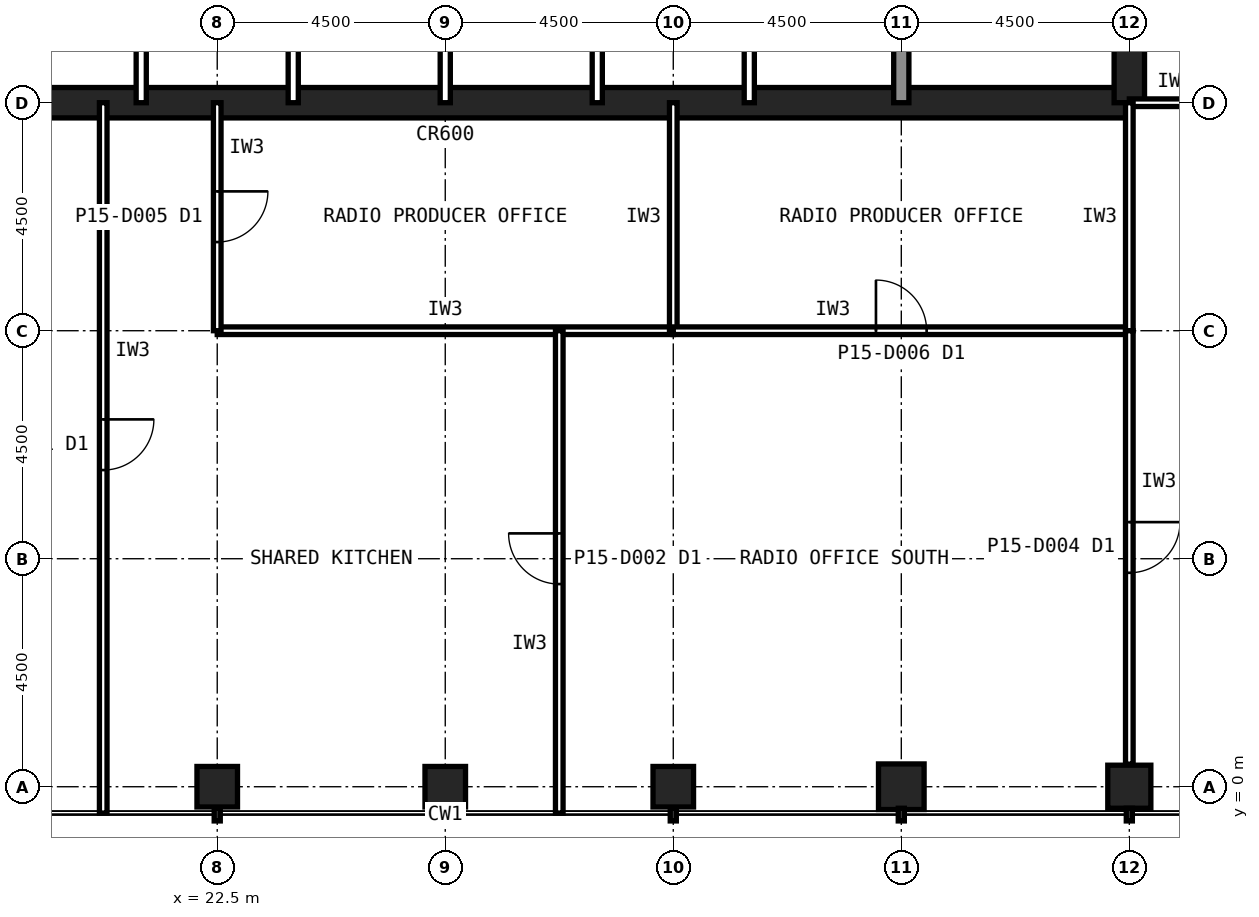
"""IFC4 building model, lengths in metres.
Left out: names, types, materials, properties, quantities, classifications, styles, units other than length and angle.
Written with IfcOpenShell. Run it as: python <this file> out.ifc"""

import sys

from ifc_helpers import new_model, si_unit, direction, frame, frame_2d, origin, origin_2d, place, context, subcontext, project, spatial, rectangle, hollow_rectangle, extrude, element, fill, save


model = new_model("IFC4")
c1 = context("Model", 3, precision=1e-05, world=origin(), true_north=direction((0.0, 1.0)))
c2 = subcontext(c1, "Body", "Model", "MODEL_VIEW")
j1 = project(units=[si_unit("LENGTHUNIT", "METRE"), si_unit("PLANEANGLEUNIT", "RADIAN")], contexts=[c1])
p1 = place(None, origin())
s1 = spatial("IfcSite", under=j1, at=p1, CompositionType="ELEMENT")
p2 = place(p1, origin())
s2 = spatial("IfcBuilding", under=s1, at=p2, CompositionType="ELEMENT")
p3 = place(p2, frame((0.0, 0.0, 62.6)))
s3 = spatial("IfcBuildingStorey", under=s2, at=p3, CompositionType="ELEMENT", Elevation=62.6)
for number, where, z_axis, x_axis in (
    (1, (22.5, 0.0, 0.0), (0.0, 0.0, 1.0), (1.0, 0.0, 0.0)),
    (2, (27.0, 0.0, 0.0), (0.0, 0.0, 1.0), (1.0, 0.0, 0.0)),
    (3, (31.5, 0.0, 0.0), (0.0, 0.0, 1.0), (1.0, 0.0, 0.0)),
):
    element("IfcColumn", number, at=place(p3, frame(where, z_axis=z_axis, x_axis=x_axis)), inside=s3, PredefinedType="COLUMN", context=c2, shape_type="SweptSolid", body=[
        extrude(hollow_rectangle(XDim=0.8, YDim=0.8, WallThickness=0.045, at=origin_2d()), origin(), (0.0, 0.0, 1.0), 4.2),
    ])
p4 = place(p3, frame((36.0, 0.0, 0.0), z_axis=(0.0, 0.0, 1.0), x_axis=(1.0, 0.0, 0.0)))
e4 = element("IfcColumn", 4, at=p4, inside=s3, PredefinedType="COLUMN", context=c2, shape_type="SweptSolid", body=[
    extrude(hollow_rectangle(XDim=0.9, YDim=0.9, WallThickness=0.063, at=origin_2d()), origin(), (0.0, 0.0, 1.0), 4.2),
])
p5 = place(p3, frame((40.5, 0.0, 0.0), z_axis=(0.0, 0.0, 1.0), x_axis=(1.0, 0.0, 0.0)))
e5 = element("IfcColumn", 5, at=p5, inside=s3, PredefinedType="COLUMN", context=c2, shape_type="SweptSolid", body=[
    extrude(hollow_rectangle(XDim=0.85, YDim=0.85, WallThickness=0.05, at=origin_2d()), origin(), (0.0, 0.0, 1.0), 4.2),
])
p6 = place(p3, frame((13.5, 13.5, 0.0), z_axis=(0.0, 0.0, 1.0), x_axis=(1.0, 0.0, 0.0)))
e6 = element("IfcWall", 6, at=p6, inside=s3, PredefinedType="SHEAR", context=c2, shape_type="SweptSolid", body=[
    extrude(rectangle(XDim=27.0, YDim=0.6, at=frame_2d((13.5, 0.0))), origin(), (0.0, 0.0, 1.0), 4.2),
])
p7 = place(p3, frame((40.5, 13.5, 0.0), z_axis=(0.0, 0.0, 1.0), x_axis=(0.0, 1.0, 0.0)))
e7 = element("IfcWall", 7, at=p7, inside=s3, PredefinedType="SHEAR", context=c2, shape_type="SweptSolid", body=[
    extrude(rectangle(XDim=27.0, YDim=0.6, at=frame_2d((13.5, 0.0))), origin(), (0.0, 0.0, 1.0), 4.2),
])
p8 = place(p7, frame((5.85, 0.0, 0.0)))
e8 = element("IfcOpeningElement", 8, at=p8, cuts=e7, PredefinedType="OPENING", context=c2, shape_type="SweptSolid", body=[
    extrude(rectangle(XDim=1.8, YDim=2.1, at=frame_2d((0.9, 1.05))), frame((0.0, 0.31, 0.0), z_axis=(0.0, -1.0, 0.0), x_axis=(1.0, 0.0, 0.0)), (0.0, 0.0, 1.0), 0.62),
])
p9 = place(p7, frame((19.65, 0.0, 0.0)))
e9 = element("IfcOpeningElement", 9, at=p9, cuts=e7, PredefinedType="OPENING", context=c2, shape_type="SweptSolid", body=[
    extrude(rectangle(XDim=1.2, YDim=2.1, at=frame_2d((0.6, 1.05))), frame((0.0, 0.31, 0.0), z_axis=(0.0, -1.0, 0.0), x_axis=(1.0, 0.0, 0.0)), (0.0, 0.0, 1.0), 0.62),
])
p10 = place(p3, frame((36.0, 13.5, 0.0), z_axis=(0.0, 0.0, 1.0), x_axis=(0.0, 1.0, 0.0)))
e10 = element("IfcWall", 10, at=p10, inside=s3, PredefinedType="SOLIDWALL", context=c2, shape_type="SweptSolid", body=[
    extrude(rectangle(XDim=4.5, YDim=0.3, at=frame_2d((2.25, 0.0))), origin(), (0.0, 0.0, 1.0), 4.04),
])
for number, where, z_axis, x_axis in (
    (11, (21.0, 13.5, 0.0), (0.0, 0.0, 1.0), (0.0, 1.0, 0.0)),
    (12, (24.0, 13.5, 0.0), (0.0, 0.0, 1.0), (0.0, 1.0, 0.0)),
    (13, (27.0, 13.5, 0.0), (0.0, 0.0, 1.0), (0.0, 1.0, 0.0)),
    (14, (30.0, 13.5, 0.0), (0.0, 0.0, 1.0), (0.0, 1.0, 0.0)),
    (15, (33.0, 13.5, 0.0), (0.0, 0.0, 1.0), (0.0, 1.0, 0.0)),
):
    element("IfcWall", number, at=place(p3, frame(where, z_axis=z_axis, x_axis=x_axis)), inside=s3, PredefinedType="PARTITIONING", context=c2, shape_type="SweptSolid", body=[
        extrude(rectangle(XDim=4.5, YDim=0.2, at=frame_2d((2.25, 0.0))), origin(), (0.0, 0.0, 1.0), 4.04),
    ])
p11 = place(p3, frame((40.5, 13.5, 0.0), z_axis=(0.0, 0.0, 1.0), x_axis=(1.0, 0.0, 0.0)))
e16 = element("IfcWall", 16, at=p11, inside=s3, PredefinedType="PARTITIONING", context=c2, shape_type="SweptSolid", body=[
    extrude(rectangle(XDim=1.8, YDim=0.15, at=frame_2d((0.9, 0.0))), origin(), (0.0, 0.0, 1.0), 3.189),
])
p12 = place(p3, frame((22.5, 9.0, 0.0), z_axis=(0.0, 0.0, 1.0), x_axis=(1.0, 0.0, 0.0)))
e17 = element("IfcWall", 17, at=p12, inside=s3, PredefinedType="PARTITIONING", context=c2, shape_type="SweptSolid", body=[
    extrude(rectangle(XDim=9.0, YDim=0.15, at=frame_2d((4.5, 0.0))), origin(), (0.0, 0.0, 1.0), 4.04),
])
p13 = place(p3, frame((31.5, 9.0, 0.0), z_axis=(0.0, 0.0, 1.0), x_axis=(0.0, 1.0, 0.0)))
e18 = element("IfcWall", 18, at=p13, inside=s3, PredefinedType="PARTITIONING", context=c2, shape_type="SweptSolid", body=[
    extrude(rectangle(XDim=4.5, YDim=0.15, at=frame_2d((2.25, 0.0))), origin(), (0.0, 0.0, 1.0), 3.189),
])
p14 = place(p3, frame((22.5, 13.5, 0.0), z_axis=(0.0, 0.0, 1.0), x_axis=(0.0, -1.0, 0.0)))
e19 = element("IfcWall", 19, at=p14, inside=s3, PredefinedType="PARTITIONING", context=c2, shape_type="SweptSolid", body=[
    extrude(rectangle(XDim=4.5, YDim=0.15, at=frame_2d((2.25, 0.0))), origin(), (0.0, 0.0, 1.0), 3.189),
])
p15 = place(p14, frame((1.75, 0.0, 0.0)))
e20 = element("IfcOpeningElement", 20, at=p15, cuts=e19, PredefinedType="OPENING", context=c2, shape_type="SweptSolid", body=[
    extrude(rectangle(XDim=1.0, YDim=2.1, at=frame_2d((0.5, 1.05))), frame((0.0, 0.085, 0.0), z_axis=(0.0, -1.0, 0.0), x_axis=(1.0, 0.0, 0.0)), (0.0, 0.0, 1.0), 0.17),
])
p16 = place(p3, frame((31.5, 9.0, 0.0), z_axis=(0.0, 0.0, 1.0), x_axis=(1.0, 0.0, 0.0)))
e21 = element("IfcWall", 21, at=p16, inside=s3, PredefinedType="PARTITIONING", context=c2, shape_type="SweptSolid", body=[
    extrude(rectangle(XDim=9.0, YDim=0.15, at=frame_2d((4.5, 0.0))), origin(), (0.0, 0.0, 1.0), 4.04),
])
p17 = place(p16, frame((4.0, 0.0, 0.0)))
e22 = element("IfcOpeningElement", 22, at=p17, cuts=e21, PredefinedType="OPENING", context=c2, shape_type="SweptSolid", body=[
    extrude(rectangle(XDim=1.0, YDim=2.1, at=frame_2d((0.5, 1.05))), frame((0.0, 0.085, 0.0), z_axis=(0.0, -1.0, 0.0), x_axis=(1.0, 0.0, 0.0)), (0.0, 0.0, 1.0), 0.17),
])
p18 = place(p3, frame((40.5, 9.0, 0.0), z_axis=(0.0, 0.0, 1.0), x_axis=(0.0, 1.0, 0.0)))
e23 = element("IfcWall", 23, at=p18, inside=s3, PredefinedType="PARTITIONING", context=c2, shape_type="SweptSolid", body=[
    extrude(rectangle(XDim=4.5, YDim=0.15, at=frame_2d((2.25, 0.0))), origin(), (0.0, 0.0, 1.0), 3.189),
])
p19 = place(p3, frame((40.5, 9.0, 0.0), z_axis=(0.0, 0.0, 1.0), x_axis=(0.0, -1.0, 0.0)))
e24 = element("IfcWall", 24, at=p19, inside=s3, PredefinedType="PARTITIONING", context=c2, shape_type="SweptSolid", body=[
    extrude(rectangle(XDim=8.555, YDim=0.15, at=frame_2d((4.277, 0.0))), origin(), (0.0, 0.0, 1.0), 3.189),
])
p20 = place(p19, frame((3.778, 0.0, 0.0)))
e25 = element("IfcOpeningElement", 25, at=p20, cuts=e24, PredefinedType="OPENING", context=c2, shape_type="SweptSolid", body=[
    extrude(rectangle(XDim=1.0, YDim=2.1, at=frame_2d((0.5, 1.05))), frame((0.0, 0.085, 0.0), z_axis=(0.0, -1.0, 0.0), x_axis=(1.0, 0.0, 0.0)), (0.0, 0.0, 1.0), 0.17),
])
p21 = place(p3, frame((29.25, -0.52, 0.0), z_axis=(0.0, 0.0, 1.0), x_axis=(0.0, 1.0, 0.0)))
e26 = element("IfcWall", 26, at=p21, inside=s3, PredefinedType="PARTITIONING", context=c2, shape_type="SweptSolid", body=[
    extrude(rectangle(XDim=9.52, YDim=0.15, at=frame_2d((4.76, 0.0))), origin(), (0.0, 0.0, 1.0), 4.04),
])
p22 = place(p21, frame((4.52, 0.0, 0.0)))
e27 = element("IfcOpeningElement", 27, at=p22, cuts=e26, PredefinedType="OPENING", context=c2, shape_type="SweptSolid", body=[
    extrude(rectangle(XDim=1.0, YDim=2.1, at=frame_2d((0.5, 1.05))), frame((0.0, 0.085, 0.0), z_axis=(0.0, -1.0, 0.0), x_axis=(1.0, 0.0, 0.0)), (0.0, 0.0, 1.0), 0.17),
])
p23 = place(p3, frame((20.25, 13.5, 0.0), z_axis=(0.0, 0.0, 1.0), x_axis=(0.0, -1.0, 0.0)))
e28 = element("IfcWall", 28, at=p23, inside=s3, PredefinedType="PARTITIONING", context=c2, shape_type="SweptSolid", body=[
    extrude(rectangle(XDim=14.02, YDim=0.15, at=frame_2d((7.01, 0.0))), origin(), (0.0, 0.0, 1.0), 4.04),
])
p24 = place(p23, frame((6.25, 0.0, 0.0)))
e29 = element("IfcOpeningElement", 29, at=p24, cuts=e28, PredefinedType="OPENING", context=c2, shape_type="SweptSolid", body=[
    extrude(rectangle(XDim=1.0, YDim=2.1, at=frame_2d((0.5, 1.05))), frame((0.0, 0.085, 0.0), z_axis=(0.0, -1.0, 0.0), x_axis=(1.0, 0.0, 0.0)), (0.0, 0.0, 1.0), 0.17),
])
p25 = place(p15, origin())
e30 = element("IfcDoor", 30, at=p25, inside=s3, OperationType="SINGLE_SWING_LEFT", PredefinedType="DOOR", context=c2, shape_type="SweptSolid", body=[
    extrude(rectangle(XDim=1.0, YDim=2.1, at=frame_2d((0.5, 1.05))), frame((0.0, 0.025, 0.0), z_axis=(0.0, -1.0, 0.0), x_axis=(1.0, 0.0, 0.0)), (0.0, 0.0, 1.0), 0.05),
])
fill(e20, e30)
p26 = place(p17, origin())
e31 = element("IfcDoor", 31, at=p26, inside=s3, OperationType="SINGLE_SWING_LEFT", PredefinedType="DOOR", context=c2, shape_type="SweptSolid", body=[
    extrude(rectangle(XDim=1.0, YDim=2.1, at=frame_2d((0.5, 1.05))), frame((0.0, 0.025, 0.0), z_axis=(0.0, -1.0, 0.0), x_axis=(1.0, 0.0, 0.0)), (0.0, 0.0, 1.0), 0.05),
])
fill(e22, e31)
p27 = place(p20, origin())
e32 = element("IfcDoor", 32, at=p27, inside=s3, OperationType="SINGLE_SWING_LEFT", PredefinedType="DOOR", context=c2, shape_type="SweptSolid", body=[
    extrude(rectangle(XDim=1.0, YDim=2.1, at=frame_2d((0.5, 1.05))), frame((0.0, 0.025, 0.0), z_axis=(0.0, -1.0, 0.0), x_axis=(1.0, 0.0, 0.0)), (0.0, 0.0, 1.0), 0.05),
])
fill(e25, e32)
p28 = place(p22, origin())
e33 = element("IfcDoor", 33, at=p28, inside=s3, OperationType="SINGLE_SWING_RIGHT", PredefinedType="DOOR", context=c2, shape_type="SweptSolid", body=[
    extrude(rectangle(XDim=1.0, YDim=2.1, at=frame_2d((0.5, 1.05))), frame((0.0, 0.025, 0.0), z_axis=(0.0, -1.0, 0.0), x_axis=(1.0, 0.0, 0.0)), (0.0, 0.0, 1.0), 0.05),
])
fill(e27, e33)
p29 = place(p24, origin())
e34 = element("IfcDoor", 34, at=p29, inside=s3, OperationType="SINGLE_SWING_LEFT", PredefinedType="DOOR", context=c2, shape_type="SweptSolid", body=[
    extrude(rectangle(XDim=1.0, YDim=2.1, at=frame_2d((0.5, 1.05))), frame((0.0, 0.025, 0.0), z_axis=(0.0, -1.0, 0.0), x_axis=(1.0, 0.0, 0.0)), (0.0, 0.0, 1.0), 0.05),
])
fill(e29, e34)
save(model, sys.argv[1])
